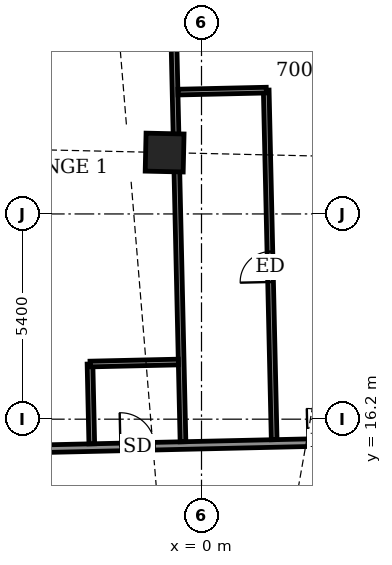
"""IFC4 building model, lengths in metres.
Left out: names, types, materials, properties, quantities, classifications, styles, units other than length and angle.
Written with IfcOpenShell. Run it as: python <this file> out.ifc"""

import sys

from ifc_helpers import new_model, si_unit, direction, frame, frame_2d, origin, origin_2d, place, context, subcontext, project, spatial, rectangle, extrude, element, fill, save


model = new_model("IFC4")
c1 = context("Model", 3, precision=1e-05, world=origin(), true_north=direction((0.0, 1.0)))
c2 = subcontext(c1, "Body", "Model", "MODEL_VIEW")
j1 = project(units=[si_unit("LENGTHUNIT", "METRE"), si_unit("PLANEANGLEUNIT", "RADIAN")], contexts=[c1])
p1 = place(None, origin())
s1 = spatial("IfcSite", under=j1, at=p1, CompositionType="ELEMENT")
p2 = place(p1, origin())
s2 = spatial("IfcBuilding", under=s1, at=p2, CompositionType="ELEMENT")
p3 = place(p2, frame((0.0, 0.0, 275.3)))
s3 = spatial("IfcBuildingStorey", under=s2, at=p3, CompositionType="ELEMENT", Elevation=275.3)
p4 = place(p3, frame((-0.97, 23.215, -0.55), z_axis=(0.0, 0.0, 1.0), x_axis=(-0.999743636626, 0.022642019015, 0.0)))
e1 = element("IfcColumn", 1, at=p4, inside=s3, PredefinedType="COLUMN", context=c2, shape_type="SweptSolid", body=[
    extrude(rectangle(XDim=1.0, YDim=1.0, at=origin_2d()), origin(), (0.0, 0.0, 1.0), 4.6),
])
p5 = place(p3, frame((-24.566, 14.96, 0.0), z_axis=(0.0, 0.0, 1.0), x_axis=(0.999742854064, 0.022676546211, 0.0)))
e2 = element("IfcWall", 2, at=p5, inside=s3, PredefinedType="PARTITIONING", context=c2, shape_type="SweptSolid", body=[
    extrude(rectangle(XDim=54.025, YDim=0.2, at=frame_2d((27.012, 0.0))), origin(), (0.0, 0.0, 1.0), 2.35),
])
p6 = place(p5, frame((51.031, 0.0, 0.0)))
e3 = element("IfcOpeningElement", 3, at=p6, cuts=e2, PredefinedType="OPENING", context=c2, shape_type="SweptSolid", body=[
    extrude(rectangle(XDim=1.0, YDim=2.1, at=frame_2d((0.5, 1.05))), frame((0.0, 0.11, 0.0), z_axis=(0.0, -1.0, 0.0), x_axis=(1.0, 0.0, 0.0)), (0.0, 0.0, 1.0), 0.22),
])
p7 = place(p5, frame((46.164, 0.0, 0.0)))
e4 = element("IfcOpeningElement", 4, at=p7, cuts=e2, PredefinedType="OPENING", context=c2, shape_type="SweptSolid", body=[
    extrude(rectangle(XDim=1.0, YDim=2.1, at=frame_2d((0.5, 1.05))), frame((0.0, 0.11, 0.0), z_axis=(0.0, -1.0, 0.0), x_axis=(1.0, 0.0, 0.0)), (0.0, 0.0, 1.0), 0.22),
])
p8 = place(p5, frame((41.639, 0.0, 0.0)))
e5 = element("IfcOpeningElement", 5, at=p8, cuts=e2, PredefinedType="OPENING", context=c2, shape_type="SweptSolid", body=[
    extrude(rectangle(XDim=1.0, YDim=2.1, at=frame_2d((0.5, 1.05))), frame((0.0, 0.11, 0.0), z_axis=(0.0, -1.0, 0.0), x_axis=(1.0, 0.0, 0.0)), (0.0, 0.0, 1.0), 0.22),
])
p9 = place(p5, frame((37.389, 0.0, 0.0)))
e6 = element("IfcOpeningElement", 6, at=p9, cuts=e2, PredefinedType="OPENING", context=c2, shape_type="SweptSolid", body=[
    extrude(rectangle(XDim=0.9, YDim=2.1, at=frame_2d((0.45, 1.05))), frame((0.0, 0.11, 0.0), z_axis=(0.0, -1.0, 0.0), x_axis=(1.0, 0.0, 0.0)), (0.0, 0.0, 1.0), 0.22),
])
p10 = place(p5, frame((29.989, 0.0, 0.0)))
e7 = element("IfcOpeningElement", 7, at=p10, cuts=e2, PredefinedType="OPENING", context=c2, shape_type="SweptSolid", body=[
    extrude(rectangle(XDim=0.9, YDim=2.1, at=frame_2d((0.45, 1.05))), frame((0.0, 0.11, 0.0), z_axis=(0.0, -1.0, 0.0), x_axis=(1.0, 0.0, 0.0)), (0.0, 0.0, 1.0), 0.22),
])
p11 = place(p5, frame((27.364, 0.0, 0.0)))
e8 = element("IfcOpeningElement", 8, at=p11, cuts=e2, PredefinedType="OPENING", context=c2, shape_type="SweptSolid", body=[
    extrude(rectangle(XDim=0.9, YDim=2.1, at=frame_2d((0.45, 1.05))), frame((0.0, 0.11, 0.0), z_axis=(0.0, -1.0, 0.0), x_axis=(1.0, 0.0, 0.0)), (0.0, 0.0, 1.0), 0.22),
])
p12 = place(p5, frame((18.139, 0.0, 0.0)))
e9 = element("IfcOpeningElement", 9, at=p12, cuts=e2, PredefinedType="OPENING", context=c2, shape_type="SweptSolid", body=[
    extrude(rectangle(XDim=1.0, YDim=2.1, at=frame_2d((0.5, 1.05))), frame((0.0, 0.11, 0.0), z_axis=(0.0, -1.0, 0.0), x_axis=(1.0, 0.0, 0.0)), (0.0, 0.0, 1.0), 0.22),
])
p13 = place(p5, frame((22.439, 0.0, 0.0)))
e10 = element("IfcOpeningElement", 10, at=p13, cuts=e2, PredefinedType="OPENING", context=c2, shape_type="SweptSolid", body=[
    extrude(rectangle(XDim=0.9, YDim=2.1, at=frame_2d((0.45, 1.05))), frame((0.0, 0.11, 0.0), z_axis=(0.0, -1.0, 0.0), x_axis=(1.0, 0.0, 0.0)), (0.0, 0.0, 1.0), 0.22),
])
p14 = place(p5, frame((12.089, 0.0, 0.0)))
e11 = element("IfcOpeningElement", 11, at=p14, cuts=e2, PredefinedType="OPENING", context=c2, shape_type="SweptSolid", body=[
    extrude(rectangle(XDim=1.0, YDim=2.1, at=frame_2d((0.5, 1.05))), frame((0.0, 0.11, 0.0), z_axis=(0.0, -1.0, 0.0), x_axis=(1.0, 0.0, 0.0)), (0.0, 0.0, 1.0), 0.22),
])
p15 = place(p5, frame((2.918, 0.0, 0.0)))
e12 = element("IfcOpeningElement", 12, at=p15, cuts=e2, PredefinedType="OPENING", context=c2, shape_type="SweptSolid", body=[
    extrude(rectangle(XDim=1.0, YDim=2.1, at=frame_2d((0.5, 1.05))), frame((0.0, 0.11, 0.0), z_axis=(0.0, -1.0, 0.0), x_axis=(1.0, 0.0, 0.0)), (0.0, 0.0, 1.0), 0.22),
])
p16 = place(p3, frame((-2.887, 15.552, 0.0), z_axis=(0.0, 0.0, 1.0), x_axis=(-0.022444036695, 0.999748100882, 0.0)))
e13 = element("IfcWall", 13, at=p16, inside=s3, PredefinedType="PARTITIONING", context=c2, shape_type="SweptSolid", body=[
    extrude(rectangle(XDim=2.099, YDim=0.15, at=frame_2d((1.05, 0.0))), origin(), (0.0, 0.0, 1.0), 4.05),
])
p17 = place(p3, frame((-0.487, 15.606, 0.0), z_axis=(0.0, 0.0, 1.0), x_axis=(-0.022661475803, 0.999743195783, 0.0)))
e14 = element("IfcWall", 14, at=p17, inside=s3, PredefinedType="PARTITIONING", context=c2, shape_type="SweptSolid", body=[
    extrude(rectangle(XDim=12.4, YDim=0.15, at=frame_2d((6.2, 0.0))), origin(), (0.0, 0.0, 1.0), 4.05),
])
p18 = place(p3, frame((1.912, 15.661, 0.0), z_axis=(0.0, 0.0, 1.0), x_axis=(-0.022743710504, 0.999741328361, 0.0)))
e15 = element("IfcWall", 15, at=p18, inside=s3, PredefinedType="PARTITIONING", context=c2, shape_type="SweptSolid", body=[
    extrude(rectangle(XDim=9.199, YDim=0.15, at=frame_2d((4.6, 0.0))), origin(), (0.0, 0.0, 1.0), 2.35),
])
p19 = place(p18, frame((4.15, 0.0, 0.0)))
e16 = element("IfcOpeningElement", 16, at=p19, cuts=e15, PredefinedType="OPENING", context=c2, shape_type="SweptSolid", body=[
    extrude(rectangle(XDim=0.8, YDim=2.1, at=frame_2d((0.4, 1.05))), frame((0.0, 0.085, 0.0), z_axis=(0.0, -1.0, 0.0), x_axis=(1.0, 0.0, 0.0)), (0.0, 0.0, 1.0), 0.17),
])
p20 = place(p3, frame((-2.932, 17.651, 0.0), z_axis=(0.0, 0.0, 1.0), x_axis=(0.999737862264, 0.022895561926, 0.0)))
e17 = element("IfcWall", 17, at=p20, inside=s3, PredefinedType="PARTITIONING", context=c2, shape_type="SweptSolid", body=[
    extrude(rectangle(XDim=2.324, YDim=0.15, at=frame_2d((1.162, 0.0))), origin(), (0.0, 0.0, 1.0), 2.85),
])
p21 = place(p3, frame((-0.619, 24.806, 0.0), z_axis=(0.0, 0.0, 1.0), x_axis=(0.999749744571, 0.022370700241, 0.0)))
e18 = element("IfcWall", 18, at=p21, inside=s3, PredefinedType="PARTITIONING", context=c2, shape_type="SweptSolid", body=[
    extrude(rectangle(XDim=2.324, YDim=0.15, at=frame_2d((1.162, 0.0))), origin(), (0.0, 0.0, 1.0), 4.05),
])
p22 = place(p11, origin())
e19 = element("IfcDoor", 19, at=p22, inside=s3, OperationType="SINGLE_SWING_LEFT", PredefinedType="DOOR", context=c2, shape_type="SweptSolid", body=[
    extrude(rectangle(XDim=0.9, YDim=2.1, at=frame_2d((0.45, 1.05))), frame((0.0, 0.025, 0.0), z_axis=(0.0, -1.0, 0.0), x_axis=(1.0, 0.0, 0.0)), (0.0, 0.0, 1.0), 0.05),
])
fill(e8, e19)
p23 = place(p19, origin())
e20 = element("IfcDoor", 20, at=p23, inside=s3, OperationType="SINGLE_SWING_LEFT", PredefinedType="DOOR", context=c2, shape_type="SweptSolid", body=[
    extrude(rectangle(XDim=0.8, YDim=2.1, at=frame_2d((0.4, 1.05))), frame((0.0, 0.025, 0.0), z_axis=(0.0, -1.0, 0.0), x_axis=(1.0, 0.0, 0.0)), (0.0, 0.0, 1.0), 0.05),
])
fill(e16, e20)
p24 = place(p13, origin())
e21 = element("IfcDoor", 21, at=p24, inside=s3, OperationType="SINGLE_SWING_LEFT", PredefinedType="DOOR", context=c2, shape_type="SweptSolid", body=[
    extrude(rectangle(XDim=0.9, YDim=2.1, at=frame_2d((0.45, 1.05))), frame((0.0, 0.025, 0.0), z_axis=(0.0, -1.0, 0.0), x_axis=(1.0, 0.0, 0.0)), (0.0, 0.0, 1.0), 0.05),
])
fill(e10, e21)
save(model, sys.argv[1])
